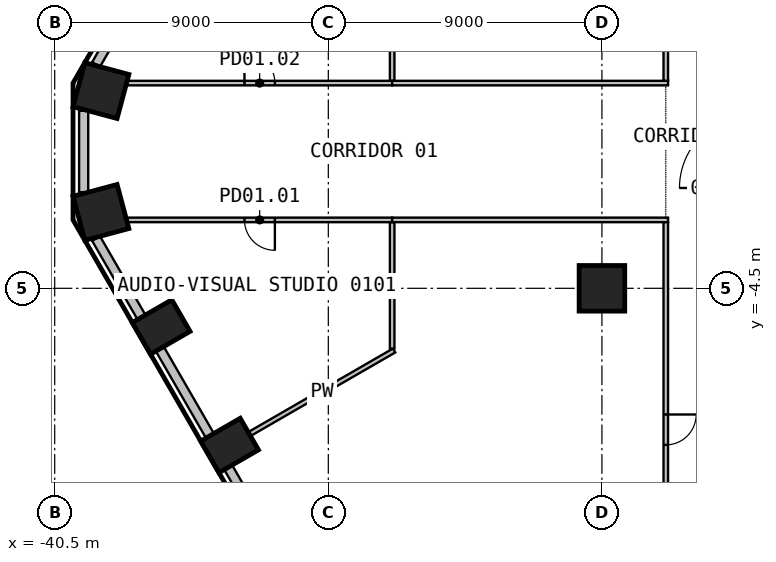
"""IFC4 building model, lengths in metres.
Left out: names, types, materials, properties, quantities, classifications, styles, units other than length and angle.
Written with IfcOpenShell. Run it as: python <this file> out.ifc"""

import sys

from ifc_helpers import new_model, si_unit, direction, frame, frame_2d, origin, origin_2d, place, context, subcontext, project, spatial, rectangle, circle, extrude, element, fill, save


model = new_model("IFC4")
c1 = context("Model", 3, precision=1e-05, world=origin(), true_north=direction((0.0, 1.0)))
c2 = subcontext(c1, "Body", "Model", "MODEL_VIEW")
j1 = project(units=[si_unit("LENGTHUNIT", "METRE"), si_unit("PLANEANGLEUNIT", "RADIAN")], contexts=[c1])
p1 = place(None, origin())
s1 = spatial("IfcSite", under=j1, at=p1, CompositionType="ELEMENT")
p2 = place(p1, origin())
s2 = spatial("IfcBuilding", under=s1, at=p2, CompositionType="ELEMENT")
p3 = place(p2, frame((0.0, 0.0, 6.0)))
s3 = spatial("IfcBuildingStorey", under=s2, at=p3, CompositionType="ELEMENT", Elevation=6.0)
for number, where, z_axis, x_axis in (
    (1, (-38.979, 2.004, 0.0), (0.0, 0.0, 1.0), (-0.259, -0.966, 0.0)),
    (2, (-38.979, -2.004, 0.0), (0.0, 0.0, 1.0), (0.259, -0.966, 0.0)),
):
    element("IfcColumn", number, at=place(p3, frame(where, z_axis=z_axis, x_axis=x_axis)), inside=s3, PredefinedType="COLUMN", context=c2, shape_type="SweptSolid", body=[
        extrude(rectangle(XDim=1.5, YDim=1.5, at=origin_2d()), origin(), (0.0, 0.0, 1.0), 4.4),
    ])
for number, where, z_axis, x_axis in (
    (3, (-36.998, -5.772, 0.0), (0.0, 0.0, 1.0), (0.5, -0.866, 0.0)),
    (4, (-34.748, -9.669, 0.0), (0.0, 0.0, 1.0), (0.5, -0.866, 0.0)),
):
    element("IfcColumn", number, at=place(p3, frame(where, z_axis=z_axis, x_axis=x_axis)), inside=s3, PredefinedType="COLUMN", context=c2, shape_type="SweptSolid", body=[
        extrude(rectangle(XDim=1.2, YDim=1.5, at=origin_2d()), origin(), (0.0, 0.0, 1.0), 4.4),
    ])
p4 = place(p3, frame((-22.5, -4.5, 0.0), z_axis=(0.0, 0.0, 1.0), x_axis=(1.0, 0.0, 0.0)))
e5 = element("IfcColumn", 5, at=p4, inside=s3, PredefinedType="COLUMN", context=c2, shape_type="SweptSolid", body=[
    extrude(circle(Radius=0.75, at=origin_2d()), origin(), (0.0, 0.0, 1.0), 4.4),
])
p5 = place(p3, frame((-37.644, 5.452, 0.0), z_axis=(0.0, 0.0, 1.0), x_axis=(-0.49999586137, -0.866027793211, 0.0)))
e6 = element("IfcWall", 6, at=p5, inside=s3, PredefinedType="SOLIDWALL", context=c2, shape_type="SweptSolid", body=[
    extrude(rectangle(XDim=2.989, YDim=0.3, at=frame_2d((1.494, 0.0))), origin(), (0.0, 0.0, 1.0), 4.4),
])
p6 = place(p3, frame((-39.547, 1.339, 0.0), z_axis=(0.0, 0.0, 1.0), x_axis=(0.0, -1.0, 0.0)))
e7 = element("IfcWall", 7, at=p6, inside=s3, PredefinedType="SOLIDWALL", context=c2, shape_type="SweptSolid", body=[
    extrude(rectangle(XDim=2.679, YDim=0.3, at=frame_2d((1.339, 0.0))), origin(), (0.0, 0.0, 1.0), 4.4),
])
p7 = place(p3, frame((-39.139, -2.864, 0.0), z_axis=(0.0, 0.0, 1.0), x_axis=(0.49999586137, -0.866027793211, 0.0)))
e8 = element("IfcWall", 8, at=p7, inside=s3, PredefinedType="SOLIDWALL", context=c2, shape_type="SweptSolid", body=[
    extrude(rectangle(XDim=2.989, YDim=0.3, at=frame_2d((1.494, 0.0))), origin(), (0.0, 0.0, 1.0), 4.4),
])
for number, where, z_axis, x_axis in (
    (9, (-37.044, -6.492, 0.0), (0.0, 0.0, 1.0), (0.5, -0.866, 0.0)),
    (10, (-34.794, -10.389, 0.0), (0.0, 0.0, 1.0), (0.5, -0.866, 0.0)),
):
    element("IfcWall", number, at=place(p3, frame(where, z_axis=z_axis, x_axis=x_axis)), inside=s3, PredefinedType="SOLIDWALL", context=c2, shape_type="SweptSolid", body=[
        extrude(rectangle(XDim=3.299, YDim=0.3, at=frame_2d((1.649, 0.0))), origin(), (0.0, 0.0, 1.0), 4.4),
    ])
p8 = place(p3, frame((-40.112, -12.679, 0.0), z_axis=(0.0, 0.0, 1.0), x_axis=(-0.499979704663, 0.866037120986, 0.0)))
e11 = element("IfcWall", 11, at=p8, inside=s3, PredefinedType="PARTITIONING", context=c2, shape_type="SweptSolid", body=[
    extrude(rectangle(XDim=10.296, YDim=0.15, at=frame_2d((5.148, 0.0))), origin(), (0.0, 0.0, 1.0), 4.05),
])
p9 = place(p3, frame((-29.4, -2.25, 0.0), z_axis=(0.0, 0.0, 1.0), x_axis=(-1.0, 0.0, 0.0)))
e12 = element("IfcWall", 12, at=p9, inside=s3, PredefinedType="PARTITIONING", context=c2, shape_type="SweptSolid", body=[
    extrude(rectangle(XDim=8.716, YDim=0.15, at=frame_2d((4.358, 0.0))), origin(), (0.0, 0.0, 1.0), 4.4),
])
p10 = place(p9, frame((3.858, 0.0, 0.0)))
e13 = element("IfcOpeningElement", 13, at=p10, cuts=e12, PredefinedType="OPENING", context=c2, shape_type="SweptSolid", body=[
    extrude(rectangle(XDim=1.0, YDim=2.1, at=frame_2d((0.5, 1.05))), frame((0.0, 0.085, 0.0), z_axis=(0.0, -1.0, 0.0), x_axis=(1.0, 0.0, 0.0)), (0.0, 0.0, 1.0), 0.17),
])
p11 = place(p3, frame((-38.115, 2.25, 0.0), z_axis=(0.0, 0.0, 1.0), x_axis=(1.0, 0.0, 0.0)))
e14 = element("IfcWall", 14, at=p11, inside=s3, PredefinedType="PARTITIONING", context=c2, shape_type="SweptSolid", body=[
    extrude(rectangle(XDim=8.716, YDim=0.15, at=frame_2d((4.358, 0.0))), origin(), (0.0, 0.0, 1.0), 4.4),
])
p12 = place(p11, frame((3.858, 0.0, 0.0)))
e15 = element("IfcOpeningElement", 15, at=p12, cuts=e14, PredefinedType="OPENING", context=c2, shape_type="SweptSolid", body=[
    extrude(rectangle(XDim=1.0, YDim=2.1, at=frame_2d((0.5, 1.05))), frame((0.0, 0.085, 0.0), z_axis=(0.0, -1.0, 0.0), x_axis=(1.0, 0.0, 0.0)), (0.0, 0.0, 1.0), 0.17),
])
p13 = place(p3, frame((-29.335, -6.544, 0.0), z_axis=(0.0, 0.0, 1.0), x_axis=(-0.866046852978, -0.499962847066, 0.0)))
e16 = element("IfcWall", 16, at=p13, inside=s3, PredefinedType="PARTITIONING", context=c2, shape_type="SweptSolid", body=[
    extrude(rectangle(XDim=5.48, YDim=0.15, at=frame_2d((2.74, 0.0))), origin(), (0.0, 0.0, 1.0), 4.4),
])
p14 = place(p3, frame((-29.4, -2.325, 0.0), z_axis=(0.0, 0.0, 1.0), x_axis=(0.0, -1.0, 0.0)))
e17 = element("IfcWall", 17, at=p14, inside=s3, PredefinedType="PARTITIONING", context=c2, shape_type="SweptSolid", body=[
    extrude(rectangle(XDim=4.157, YDim=0.15, at=frame_2d((2.079, 0.0))), origin(), (0.0, 0.0, 1.0), 4.4),
])
p15 = place(p3, frame((-20.325, -2.25, 0.0), z_axis=(0.0, 0.0, 1.0), x_axis=(-1.0, 0.0, 0.0)))
e18 = element("IfcWall", 18, at=p15, inside=s3, PredefinedType="PARTITIONING", context=c2, shape_type="SweptSolid", body=[
    extrude(rectangle(XDim=9.075, YDim=0.15, at=frame_2d((4.538, 0.0))), origin(), (0.0, 0.0, 1.0), 4.4),
])
p16 = place(p3, frame((-29.4, 16.899, 0.0), z_axis=(0.0, 0.0, 1.0), x_axis=(0.0, -1.0, 0.0)))
e19 = element("IfcWall", 19, at=p16, inside=s3, PredefinedType="PARTITIONING", context=c2, shape_type="SweptSolid", body=[
    extrude(rectangle(XDim=14.574, YDim=0.15, at=frame_2d((7.287, 0.0))), origin(), (0.0, 0.0, 1.0), 4.4),
])
p17 = place(p3, frame((-29.4, 2.25, 0.0), z_axis=(0.0, 0.0, 1.0), x_axis=(1.0, 0.0, 0.0)))
e20 = element("IfcWall", 20, at=p17, inside=s3, PredefinedType="PARTITIONING", context=c2, shape_type="SweptSolid", body=[
    extrude(rectangle(XDim=9.075, YDim=0.15, at=frame_2d((4.538, 0.0))), origin(), (0.0, 0.0, 1.0), 4.4),
])
p18 = place(p3, frame((-20.4, -2.325, 0.0), z_axis=(0.0, 0.0, 1.0), x_axis=(0.0, -1.0, 0.0)))
e21 = element("IfcWall", 21, at=p18, inside=s3, PredefinedType="PARTITIONING", context=c2, shape_type="SweptSolid", body=[
    extrude(rectangle(XDim=13.65, YDim=0.15, at=frame_2d((6.825, 0.0))), origin(), (0.0, 0.0, 1.0), 4.4),
])
p19 = place(p18, frame((6.325, 0.0, 0.0)))
e22 = element("IfcOpeningElement", 22, at=p19, cuts=e21, PredefinedType="OPENING", context=c2, shape_type="SweptSolid", body=[
    extrude(rectangle(XDim=1.0, YDim=2.1, at=frame_2d((0.5, 1.05))), frame((0.0, 0.085, 0.0), z_axis=(0.0, -1.0, 0.0), x_axis=(1.0, 0.0, 0.0)), (0.0, 0.0, 1.0), 0.17),
])
p20 = place(p3, frame((-20.4, 15.975, 0.0), z_axis=(0.0, 0.0, 1.0), x_axis=(0.0, -1.0, 0.0)))
e23 = element("IfcWall", 23, at=p20, inside=s3, PredefinedType="PARTITIONING", context=c2, shape_type="SweptSolid", body=[
    extrude(rectangle(XDim=13.65, YDim=0.15, at=frame_2d((6.825, 0.0))), origin(), (0.0, 0.0, 1.0), 4.4),
])
p21 = place(p20, frame((6.325, 0.0, 0.0)))
e24 = element("IfcOpeningElement", 24, at=p21, cuts=e23, PredefinedType="OPENING", context=c2, shape_type="SweptSolid", body=[
    extrude(rectangle(XDim=1.0, YDim=2.1, at=frame_2d((0.5, 1.05))), frame((0.0, 0.085, 0.0), z_axis=(0.0, -1.0, 0.0), x_axis=(1.0, 0.0, 0.0)), (0.0, 0.0, 1.0), 0.17),
])
p22 = place(p10, origin())
e25 = element("IfcDoor", 25, at=p22, inside=s3, OperationType="SINGLE_SWING_RIGHT", PredefinedType="DOOR", context=c2, shape_type="SweptSolid", body=[
    extrude(rectangle(XDim=1.0, YDim=2.1, at=frame_2d((0.5, 1.05))), frame((0.0, 0.025, 0.0), z_axis=(0.0, -1.0, 0.0), x_axis=(1.0, 0.0, 0.0)), (0.0, 0.0, 1.0), 0.05),
])
fill(e13, e25)
p23 = place(p12, origin())
e26 = element("IfcDoor", 26, at=p23, inside=s3, OperationType="SINGLE_SWING_RIGHT", PredefinedType="DOOR", context=c2, shape_type="SweptSolid", body=[
    extrude(rectangle(XDim=1.0, YDim=2.1, at=frame_2d((0.5, 1.05))), frame((0.0, 0.025, 0.0), z_axis=(0.0, -1.0, 0.0), x_axis=(1.0, 0.0, 0.0)), (0.0, 0.0, 1.0), 0.05),
])
fill(e15, e26)
p24 = place(p19, origin())
e27 = element("IfcDoor", 27, at=p24, inside=s3, OperationType="SINGLE_SWING_LEFT", PredefinedType="DOOR", context=c2, shape_type="SweptSolid", body=[
    extrude(rectangle(XDim=1.0, YDim=2.1, at=frame_2d((0.5, 1.05))), frame((0.0, 0.025, 0.0), z_axis=(0.0, -1.0, 0.0), x_axis=(1.0, 0.0, 0.0)), (0.0, 0.0, 1.0), 0.05),
])
fill(e22, e27)
save(model, sys.argv[1])
